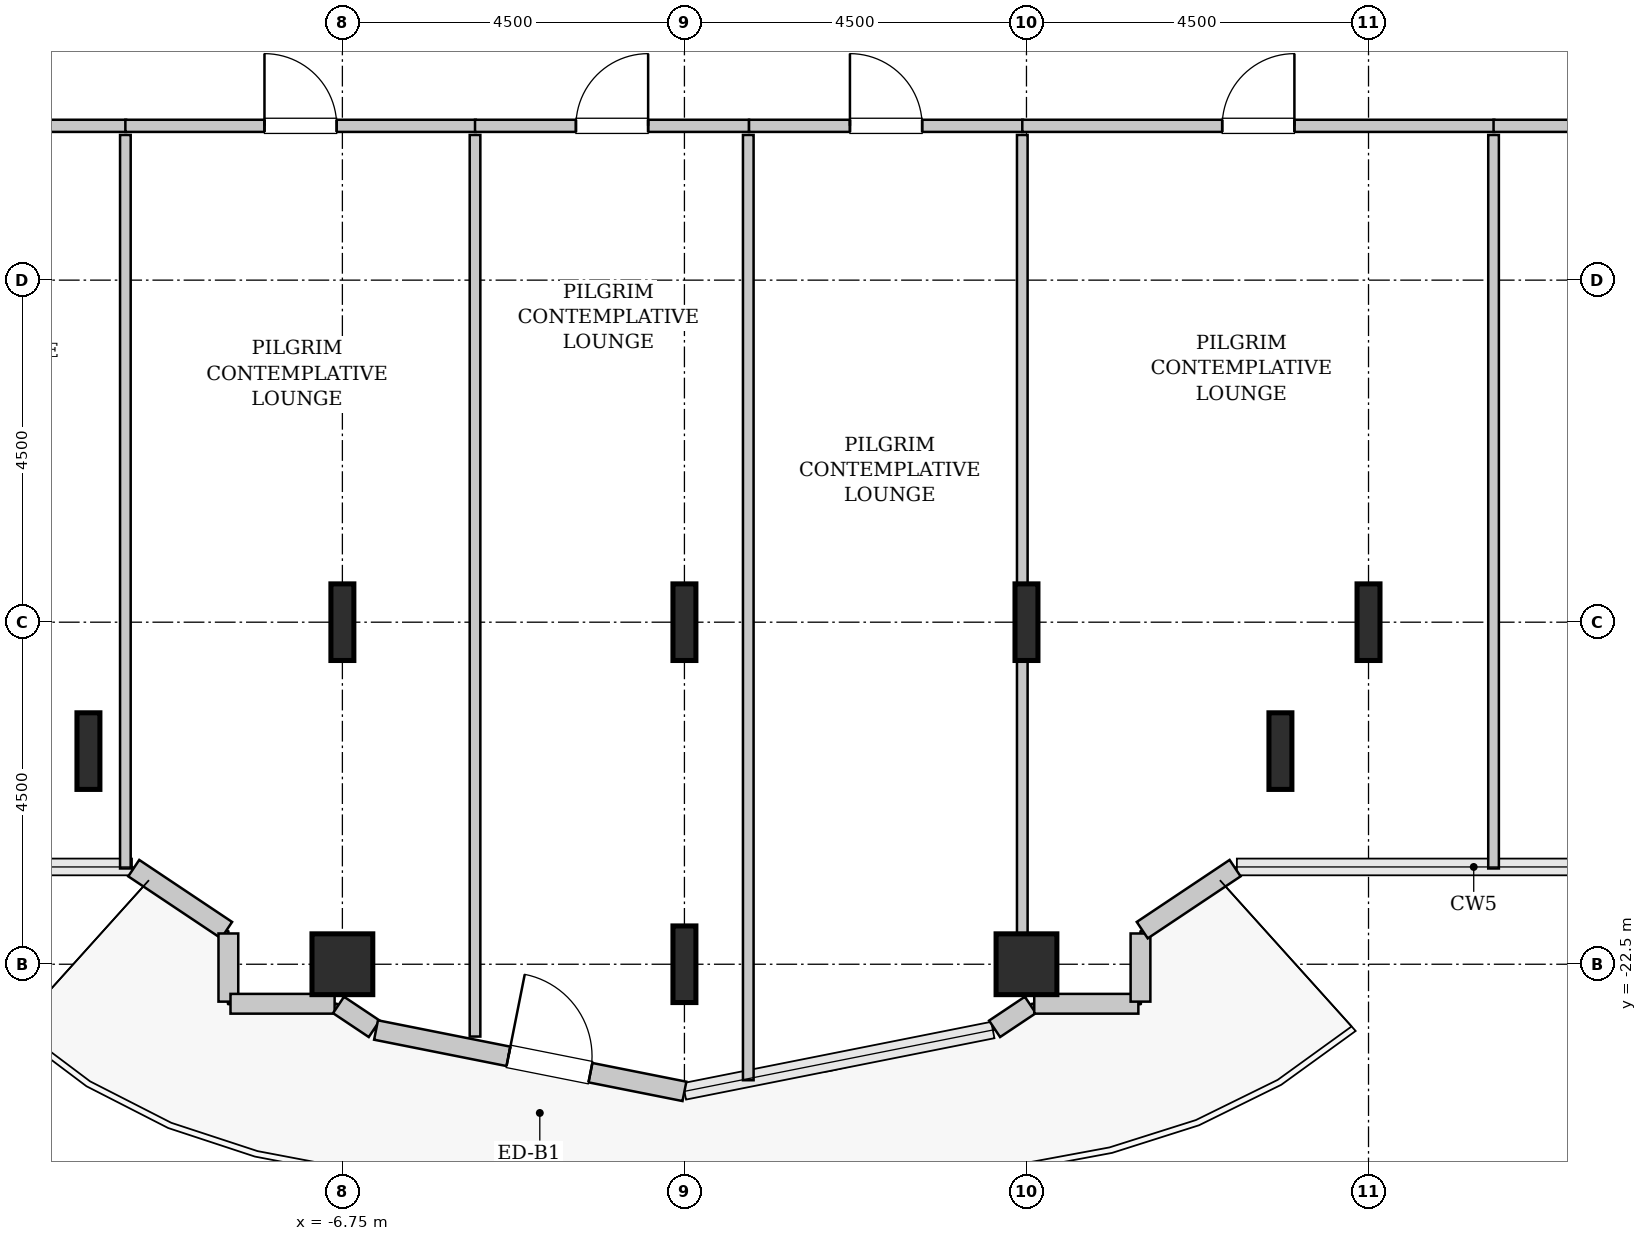
"""IFC4 building model, lengths in metres.
Left out: names, types, materials, properties, quantities, classifications, styles, units other than length and angle.
Written with IfcOpenShell. Run it as: python <this file> out.ifc"""

import sys

from ifc_helpers import new_model, si_unit, direction, frame, frame_2d, origin, origin_2d, place, context, subcontext, project, spatial, rectangle, hollow_rectangle, i_section, extrude, source, transform, mapped, element, fill, save


model = new_model("IFC4")
c1 = context("Model", 3, precision=1e-05, world=origin(), true_north=direction((0.0, 1.0)))
c2 = subcontext(c1, "Body", "Model", "MODEL_VIEW")
j1 = project(units=[si_unit("LENGTHUNIT", "METRE"), si_unit("PLANEANGLEUNIT", "RADIAN")], contexts=[c1])
p1 = place(None, origin())
s1 = spatial("IfcSite", under=j1, at=p1, CompositionType="ELEMENT")
p2 = place(p1, origin())
s2 = spatial("IfcBuilding", under=s1, at=p2, CompositionType="ELEMENT")
p3 = place(p2, frame((0.0, 0.0, 113.6)))
s3 = spatial("IfcBuildingStorey", under=s2, at=p3, CompositionType="ELEMENT", Elevation=113.6)
m1 = source(origin(), c2, "Body", "SweptSolid", [
    extrude(i_section(OverallWidth=0.302, OverallDepth=1.008, WebThickness=0.021, FlangeThickness=0.04, FilletRadius=0.03, at=origin_2d()), origin(), (0.0, 0.0, 1.0), 3.8),
])
p4 = place(p3, frame((-10.091, -19.696, 0.0), z_axis=(0.0, 0.0, 1.0), x_axis=(1.0, 0.0, 0.0)))
e1 = element("IfcColumn", 1, at=p4, inside=s3, PredefinedType="COLUMN", context=c2, shape_type="MappedRepresentation", body=[
    mapped(m1, transform((0.0, 0.0, 0.0), x_axis=(1.0, 0.0, 0.0), y_axis=(0.0, 1.0, 0.0), z_axis=(0.0, 0.0, 1.0), scale=1.0)),
])
m2 = source(origin(), c2, "Body", "SweptSolid", [
    extrude(hollow_rectangle(XDim=0.8, YDim=0.8, WallThickness=0.04, InnerFilletRadius=0.04, OuterFilletRadius=0.08, at=origin_2d()), origin(), (0.0, 0.0, 1.0), 3.8),
])
p5 = place(p3, frame((-6.75, -22.5, 0.0), z_axis=(0.0, 0.0, 1.0), x_axis=(1.0, 0.0, 0.0)))
e2 = element("IfcColumn", 2, at=p5, inside=s3, PredefinedType="COLUMN", context=c2, shape_type="MappedRepresentation", body=[
    mapped(m2, transform((0.0, 0.0, 0.0), x_axis=(1.0, 0.0, 0.0), y_axis=(0.0, 1.0, 0.0), z_axis=(0.0, 0.0, 1.0), scale=1.0)),
])
for number, where, z_axis, x_axis in (
    (3, (-6.75, -18.0, 0.0), (0.0, 0.0, 1.0), (1.0, 0.0, 0.0)),
    (4, (-2.25, -22.5, 0.0), (0.0, 0.0, 1.0), (1.0, 0.0, 0.0)),
    (5, (-2.25, -18.0, 0.0), (0.0, 0.0, 1.0), (1.0, 0.0, 0.0)),
):
    element("IfcColumn", number, at=place(p3, frame(where, z_axis=z_axis, x_axis=x_axis)), inside=s3, PredefinedType="COLUMN", context=c2, shape_type="MappedRepresentation", body=[
        mapped(m1, transform((0.0, 0.0, 0.0), x_axis=(1.0, 0.0, 0.0), y_axis=(0.0, 1.0, 0.0), z_axis=(0.0, 0.0, 1.0), scale=1.0)),
    ])
p6 = place(p3, frame((2.25, -22.5, 0.0), z_axis=(0.0, 0.0, 1.0), x_axis=(1.0, 0.0, 0.0)))
e6 = element("IfcColumn", 6, at=p6, inside=s3, PredefinedType="COLUMN", context=c2, shape_type="MappedRepresentation", body=[
    mapped(m2, transform((0.0, 0.0, 0.0), x_axis=(1.0, 0.0, 0.0), y_axis=(0.0, 1.0, 0.0), z_axis=(0.0, 0.0, 1.0), scale=1.0)),
])
for number, where, z_axis, x_axis in (
    (7, (2.25, -18.0, 0.0), (0.0, 0.0, 1.0), (1.0, 0.0, 0.0)),
    (8, (5.591, -19.696, 0.0), (0.0, 0.0, 1.0), (1.0, 0.0, 0.0)),
    (9, (6.75, -18.0, 0.0), (0.0, 0.0, 1.0), (1.0, 0.0, 0.0)),
):
    element("IfcColumn", number, at=place(p3, frame(where, z_axis=z_axis, x_axis=x_axis)), inside=s3, PredefinedType="COLUMN", context=c2, shape_type="MappedRepresentation", body=[
        mapped(m1, transform((0.0, 0.0, 0.0), x_axis=(1.0, 0.0, 0.0), y_axis=(0.0, 1.0, 0.0), z_axis=(0.0, 0.0, 1.0), scale=1.0)),
    ])
m3 = source(origin(), c2, "Body", "SweptSolid", [
    extrude(rectangle(XDim=1.469, YDim=0.26, at=frame_2d((0.734, 0.0))), origin(), (0.0, 0.0, 1.0), 3.55),
])
p7 = place(p3, frame((-9.495, -21.236, 0.0), z_axis=(0.0, 0.0, 1.0), x_axis=(0.831461760506, -0.555581983884, 0.0)))
e10 = element("IfcWall", 10, at=p7, inside=s3, PredefinedType="SOLIDWALL", context=c2, shape_type="MappedRepresentation", body=[
    mapped(m3, transform((0.0, 0.0, 0.0), x_axis=(1.0, 0.0, 0.0), y_axis=(0.0, 1.0, 0.0), z_axis=(0.0, 0.0, 1.0), scale=1.0)),
])
m4 = source(origin(), c2, "Body", "SweptSolid", [
    extrude(rectangle(XDim=0.897, YDim=0.26, at=frame_2d((0.448, 0.0))), origin(), (0.0, 0.0, 1.0), 3.55),
])
p8 = place(p3, frame((-8.25, -22.095, 0.0), z_axis=(0.0, 0.0, 1.0), x_axis=(0.0, -1.0, 0.0)))
e11 = element("IfcWall", 11, at=p8, inside=s3, PredefinedType="SOLIDWALL", context=c2, shape_type="MappedRepresentation", body=[
    mapped(m4, transform((0.0, 0.0, 0.0), x_axis=(1.0, 0.0, 0.0), y_axis=(0.0, 1.0, 0.0), z_axis=(0.0, 0.0, 1.0), scale=1.0)),
])
m5 = source(origin(), c2, "Body", "SweptSolid", [
    extrude(rectangle(XDim=1.37, YDim=0.26, at=frame_2d((0.685, 0.0))), origin(), (0.0, 0.0, 1.0), 3.55),
])
p9 = place(p3, frame((-8.222, -23.02, 0.0), z_axis=(0.0, 0.0, 1.0), x_axis=(1.0, 0.0, 0.0)))
e12 = element("IfcWall", 12, at=p9, inside=s3, PredefinedType="SOLIDWALL", context=c2, shape_type="MappedRepresentation", body=[
    mapped(m5, transform((0.0, 0.0, 0.0), x_axis=(1.0, 0.0, 0.0), y_axis=(0.0, 1.0, 0.0), z_axis=(0.0, 0.0, 1.0), scale=1.0)),
])
m6 = source(origin(), c2, "Body", "SweptSolid", [
    extrude(rectangle(XDim=0.565, YDim=0.26, at=frame_2d((0.283, 0.0))), origin(), (0.0, 0.0, 1.0), 3.55),
])
p10 = place(p3, frame((-6.801, -23.036, 0.0), z_axis=(0.0, 0.0, 1.0), x_axis=(0.831651492666, -0.555297933317, 0.0)))
e13 = element("IfcWall", 13, at=p10, inside=s3, PredefinedType="SOLIDWALL", context=c2, shape_type="MappedRepresentation", body=[
    mapped(m6, transform((0.0, 0.0, 0.0), x_axis=(1.0, 0.0, 0.0), y_axis=(0.0, 1.0, 0.0), z_axis=(0.0, 0.0, 1.0), scale=1.0)),
])
m7 = source(origin(), c2, "Body", "SweptSolid", [
    extrude(rectangle(XDim=4.137, YDim=0.26, at=frame_2d((2.068, 0.0))), origin(), (0.0, 0.0, 1.0), 3.55),
])
p11 = place(p3, frame((-6.307, -23.365, 0.0), z_axis=(0.0, 0.0, 1.0), x_axis=(0.980782170794, -0.195105954428, 0.0)))
e14 = element("IfcWall", 14, at=p11, inside=s3, PredefinedType="SOLIDWALL", context=c2, shape_type="MappedRepresentation", body=[
    mapped(m7, transform((0.0, 0.0, 0.0), x_axis=(1.0, 0.0, 0.0), y_axis=(0.0, 1.0, 0.0), z_axis=(0.0, 0.0, 1.0), scale=1.0)),
])
p12 = place(p11, frame((1.776, 0.0, 0.0)))
e15 = element("IfcOpeningElement", 15, at=p12, cuts=e14, PredefinedType="OPENING", context=c2, shape_type="SweptSolid", body=[
    extrude(rectangle(XDim=1.1, YDim=2.2, at=frame_2d((0.55, 1.1))), frame((0.0, 0.14, 0.0), z_axis=(0.0, -1.0, 0.0), x_axis=(1.0, 0.0, 0.0)), (0.0, 0.0, 1.0), 0.28),
])
p13 = place(p3, frame((1.831, -23.35, 0.0), z_axis=(0.0, 0.0, 1.0), x_axis=(0.831651492666, 0.555297933317, 0.0)))
e16 = element("IfcWall", 16, at=p13, inside=s3, PredefinedType="SOLIDWALL", context=c2, shape_type="MappedRepresentation", body=[
    mapped(m6, transform((0.0, 0.0, 0.0), x_axis=(1.0, 0.0, 0.0), y_axis=(0.0, 1.0, 0.0), z_axis=(0.0, 0.0, 1.0), scale=1.0)),
])
p14 = place(p3, frame((2.352, -23.02, 0.0), z_axis=(0.0, 0.0, 1.0), x_axis=(1.0, 0.0, 0.0)))
e17 = element("IfcWall", 17, at=p14, inside=s3, PredefinedType="SOLIDWALL", context=c2, shape_type="MappedRepresentation", body=[
    mapped(m5, transform((0.0, 0.0, 0.0), x_axis=(1.0, 0.0, 0.0), y_axis=(0.0, 1.0, 0.0), z_axis=(0.0, 0.0, 1.0), scale=1.0)),
])
p15 = place(p3, frame((3.75, -22.992, 0.0), z_axis=(0.0, 0.0, 1.0), x_axis=(0.0, 1.0, 0.0)))
e18 = element("IfcWall", 18, at=p15, inside=s3, PredefinedType="SOLIDWALL", context=c2, shape_type="MappedRepresentation", body=[
    mapped(m4, transform((0.0, 0.0, 0.0), x_axis=(1.0, 0.0, 0.0), y_axis=(0.0, 1.0, 0.0), z_axis=(0.0, 0.0, 1.0), scale=1.0)),
])
p16 = place(p3, frame((3.773, -22.052, 0.0), z_axis=(0.0, 0.0, 1.0), x_axis=(0.831461760506, 0.555581983884, 0.0)))
e19 = element("IfcWall", 19, at=p16, inside=s3, PredefinedType="SOLIDWALL", context=c2, shape_type="MappedRepresentation", body=[
    mapped(m3, transform((0.0, 0.0, 0.0), x_axis=(1.0, 0.0, 0.0), y_axis=(0.0, 1.0, 0.0), z_axis=(0.0, 0.0, 1.0), scale=1.0)),
])
m8 = source(origin(), c2, "Body", "SweptSolid", [
    extrude(rectangle(XDim=4.025, YDim=0.16, at=frame_2d((2.013, 0.0))), origin(), (0.0, 0.0, 1.0), 3.535),
])
p17 = place(p3, frame((-13.62, -11.47, 0.0), z_axis=(0.0, 0.0, 1.0), x_axis=(1.0, 0.0, 0.0)))
e20 = element("IfcWall", 20, at=p17, inside=s3, PredefinedType="PARTITIONING", context=c2, shape_type="MappedRepresentation", body=[
    mapped(m8, transform((0.0, 0.0, 0.0), x_axis=(1.0, 0.0, 0.0), y_axis=(0.0, 1.0, 0.0), z_axis=(0.0, 0.0, 1.0), scale=1.0)),
])
p18 = place(p17, frame((1.538, 0.0, 0.0)))
e21 = element("IfcOpeningElement", 21, at=p18, cuts=e20, PredefinedType="OPENING", context=c2, shape_type="SweptSolid", body=[
    extrude(rectangle(XDim=0.95, YDim=2.1, at=frame_2d((0.475, 1.05))), frame((0.0, 0.09, 0.0), z_axis=(0.0, -1.0, 0.0), x_axis=(1.0, 0.0, 0.0)), (0.0, 0.0, 1.0), 0.18),
])
m9 = source(origin(), c2, "Body", "SweptSolid", [
    extrude(rectangle(XDim=9.65, YDim=0.14, at=frame_2d((4.825, 0.0))), origin(), (0.0, 0.0, 1.0), 3.535),
])
p19 = place(p3, frame((-9.605, -21.24, 0.0), z_axis=(0.0, 0.0, 1.0), x_axis=(0.0, 1.0, 0.0)))
e22 = element("IfcWall", 22, at=p19, inside=s3, PredefinedType="PARTITIONING", context=c2, shape_type="MappedRepresentation", body=[
    mapped(m9, transform((0.0, 0.0, 0.0), x_axis=(1.0, 0.0, 0.0), y_axis=(0.0, 1.0, 0.0), z_axis=(0.0, 0.0, 1.0), scale=1.0)),
])
m10 = source(origin(), c2, "Body", "SweptSolid", [
    extrude(rectangle(XDim=4.61, YDim=0.16, at=frame_2d((2.305, 0.0))), origin(), (0.0, 0.0, 1.0), 3.535),
])
p20 = place(p3, frame((-9.605, -11.47, 0.0), z_axis=(0.0, 0.0, 1.0), x_axis=(1.0, 0.0, 0.0)))
e23 = element("IfcWall", 23, at=p20, inside=s3, PredefinedType="PARTITIONING", context=c2, shape_type="MappedRepresentation", body=[
    mapped(m10, transform((0.0, 0.0, 0.0), x_axis=(1.0, 0.0, 0.0), y_axis=(0.0, 1.0, 0.0), z_axis=(0.0, 0.0, 1.0), scale=1.0)),
])
p21 = place(p20, frame((1.83, 0.0, 0.0)))
e24 = element("IfcOpeningElement", 24, at=p21, cuts=e23, PredefinedType="OPENING", context=c2, shape_type="SweptSolid", body=[
    extrude(rectangle(XDim=0.95, YDim=2.1, at=frame_2d((0.475, 1.05))), frame((0.0, 0.09, 0.0), z_axis=(0.0, -1.0, 0.0), x_axis=(1.0, 0.0, 0.0)), (0.0, 0.0, 1.0), 0.18),
])
m11 = source(origin(), c2, "Body", "SweptSolid", [
    extrude(rectangle(XDim=11.861, YDim=0.14, at=frame_2d((5.931, 0.0))), origin(), (0.0, 0.0, 1.0), 3.535),
])
p22 = place(p3, frame((-5.005, -23.451, 0.0), z_axis=(0.0, 0.0, 1.0), x_axis=(0.0, 1.0, 0.0)))
e25 = element("IfcWall", 25, at=p22, inside=s3, PredefinedType="PARTITIONING", context=c2, shape_type="MappedRepresentation", body=[
    mapped(m11, transform((0.0, 0.0, 0.0), x_axis=(1.0, 0.0, 0.0), y_axis=(0.0, 1.0, 0.0), z_axis=(0.0, 0.0, 1.0), scale=1.0)),
])
m12 = source(origin(), c2, "Body", "SweptSolid", [
    extrude(rectangle(XDim=3.605, YDim=0.16, at=frame_2d((1.802, 0.0))), origin(), (0.0, 0.0, 1.0), 3.535),
])
p23 = place(p3, frame((-5.005, -11.47, 0.0), z_axis=(0.0, 0.0, 1.0), x_axis=(1.0, 0.0, 0.0)))
e26 = element("IfcWall", 26, at=p23, inside=s3, PredefinedType="PARTITIONING", context=c2, shape_type="MappedRepresentation", body=[
    mapped(m12, transform((0.0, 0.0, 0.0), x_axis=(1.0, 0.0, 0.0), y_axis=(0.0, 1.0, 0.0), z_axis=(0.0, 0.0, 1.0), scale=1.0)),
])
p24 = place(p23, frame((1.327, 0.0, 0.0)))
e27 = element("IfcOpeningElement", 27, at=p24, cuts=e26, PredefinedType="OPENING", context=c2, shape_type="SweptSolid", body=[
    extrude(rectangle(XDim=0.95, YDim=2.1, at=frame_2d((0.475, 1.05))), frame((0.0, 0.09, 0.0), z_axis=(0.0, -1.0, 0.0), x_axis=(1.0, 0.0, 0.0)), (0.0, 0.0, 1.0), 0.18),
])
m13 = source(origin(), c2, "Body", "SweptSolid", [
    extrude(rectangle(XDim=12.436, YDim=0.14, at=frame_2d((6.218, 0.0))), origin(), (0.0, 0.0, 1.0), 3.535),
])
p25 = place(p3, frame((-1.41, -24.026, 0.0), z_axis=(0.0, 0.0, 1.0), x_axis=(0.0, 1.0, 0.0)))
e28 = element("IfcWall", 28, at=p25, inside=s3, PredefinedType="PARTITIONING", context=c2, shape_type="MappedRepresentation", body=[
    mapped(m13, transform((0.0, 0.0, 0.0), x_axis=(1.0, 0.0, 0.0), y_axis=(0.0, 1.0, 0.0), z_axis=(0.0, 0.0, 1.0), scale=1.0)),
])
p26 = place(p3, frame((-1.4, -11.47, 0.0), z_axis=(0.0, 0.0, 1.0), x_axis=(1.0, 0.0, 0.0)))
e29 = element("IfcWall", 29, at=p26, inside=s3, PredefinedType="PARTITIONING", context=c2, shape_type="MappedRepresentation", body=[
    mapped(m12, transform((0.0, 0.0, 0.0), x_axis=(1.0, 0.0, 0.0), y_axis=(0.0, 1.0, 0.0), z_axis=(0.0, 0.0, 1.0), scale=1.0)),
])
p27 = place(p26, frame((1.327, 0.0, 0.0)))
e30 = element("IfcOpeningElement", 30, at=p27, cuts=e29, PredefinedType="OPENING", context=c2, shape_type="SweptSolid", body=[
    extrude(rectangle(XDim=0.95, YDim=2.1, at=frame_2d((0.475, 1.05))), frame((0.0, 0.09, 0.0), z_axis=(0.0, -1.0, 0.0), x_axis=(1.0, 0.0, 0.0)), (0.0, 0.0, 1.0), 0.18),
])
m14 = source(origin(), c2, "Body", "SweptSolid", [
    extrude(rectangle(XDim=11.314, YDim=0.14, at=frame_2d((5.657, 0.0))), origin(), (0.0, 0.0, 1.0), 2.875),
])
p28 = place(p3, frame((2.195, -22.904, 0.0), z_axis=(0.0, 0.0, 1.0), x_axis=(0.0, 1.0, 0.0)))
e31 = element("IfcWall", 31, at=p28, inside=s3, PredefinedType="PARTITIONING", context=c2, shape_type="MappedRepresentation", body=[
    mapped(m14, transform((0.0, 0.0, 0.0), x_axis=(1.0, 0.0, 0.0), y_axis=(0.0, 1.0, 0.0), z_axis=(0.0, 0.0, 1.0), scale=1.0)),
])
m15 = source(origin(), c2, "Body", "SweptSolid", [
    extrude(rectangle(XDim=6.21, YDim=0.16, at=frame_2d((3.105, 0.0))), origin(), (0.0, 0.0, 1.0), 3.535),
])
p29 = place(p3, frame((2.195, -11.47, 0.0), z_axis=(0.0, 0.0, 1.0), x_axis=(1.0, 0.0, 0.0)))
e32 = element("IfcWall", 32, at=p29, inside=s3, PredefinedType="PARTITIONING", context=c2, shape_type="MappedRepresentation", body=[
    mapped(m15, transform((0.0, 0.0, 0.0), x_axis=(1.0, 0.0, 0.0), y_axis=(0.0, 1.0, 0.0), z_axis=(0.0, 0.0, 1.0), scale=1.0)),
])
p30 = place(p29, frame((2.63, 0.0, 0.0)))
e33 = element("IfcOpeningElement", 33, at=p30, cuts=e32, PredefinedType="OPENING", context=c2, shape_type="SweptSolid", body=[
    extrude(rectangle(XDim=0.95, YDim=2.1, at=frame_2d((0.475, 1.05))), frame((0.0, 0.09, 0.0), z_axis=(0.0, -1.0, 0.0), x_axis=(1.0, 0.0, 0.0)), (0.0, 0.0, 1.0), 0.18),
])
p31 = place(p3, frame((8.395, -21.24, 0.0), z_axis=(0.0, 0.0, 1.0), x_axis=(0.0, 1.0, 0.0)))
e34 = element("IfcWall", 34, at=p31, inside=s3, PredefinedType="PARTITIONING", context=c2, shape_type="MappedRepresentation", body=[
    mapped(m9, transform((0.0, 0.0, 0.0), x_axis=(1.0, 0.0, 0.0), y_axis=(0.0, 1.0, 0.0), z_axis=(0.0, 0.0, 1.0), scale=1.0)),
])
m16 = source(origin(), c2, "Body", "SweptSolid", [
    extrude(rectangle(XDim=5.225, YDim=0.16, at=frame_2d((2.613, 0.0))), origin(), (0.0, 0.0, 1.0), 3.535),
])
p32 = place(p3, frame((8.395, -11.47, 0.0), z_axis=(0.0, 0.0, 1.0), x_axis=(1.0, 0.0, 0.0)))
e35 = element("IfcWall", 35, at=p32, inside=s3, PredefinedType="PARTITIONING", context=c2, shape_type="MappedRepresentation", body=[
    mapped(m16, transform((0.0, 0.0, 0.0), x_axis=(1.0, 0.0, 0.0), y_axis=(0.0, 1.0, 0.0), z_axis=(0.0, 0.0, 1.0), scale=1.0)),
])
p33 = place(p32, frame((2.137, 0.0, 0.0)))
e36 = element("IfcOpeningElement", 36, at=p33, cuts=e35, PredefinedType="OPENING", context=c2, shape_type="SweptSolid", body=[
    extrude(rectangle(XDim=0.95, YDim=2.1, at=frame_2d((0.475, 1.05))), frame((0.0, 0.09, 0.0), z_axis=(0.0, -1.0, 0.0), x_axis=(1.0, 0.0, 0.0)), (0.0, 0.0, 1.0), 0.18),
])
m17 = source(origin(), c2, "Body", "SweptSolid", [
    extrude(rectangle(XDim=1.1, YDim=2.2, at=frame_2d((0.55, 1.1))), frame((0.0, 0.025, 0.0), z_axis=(0.0, -1.0, 0.0), x_axis=(1.0, 0.0, 0.0)), (0.0, 0.0, 1.0), 0.05),
])
p34 = place(p12, origin())
e37 = element("IfcDoor", 37, at=p34, inside=s3, OperationType="SINGLE_SWING_LEFT", PredefinedType="DOOR", context=c2, shape_type="MappedRepresentation", body=[
    mapped(m17, transform((0.0, 0.0, 0.0), x_axis=(1.0, 0.0, 0.0), y_axis=(0.0, 1.0, 0.0), z_axis=(0.0, 0.0, 1.0), scale=1.0)),
])
fill(e15, e37)
m18 = source(origin(), c2, "Body", "SweptSolid", [
    extrude(rectangle(XDim=0.95, YDim=2.1, at=frame_2d((0.475, 1.05))), frame((0.0, 0.025, 0.0), z_axis=(0.0, -1.0, 0.0), x_axis=(1.0, 0.0, 0.0)), (0.0, 0.0, 1.0), 0.05),
])
p35 = place(p21, origin())
e38 = element("IfcDoor", 38, at=p35, inside=s3, OperationType="SINGLE_SWING_LEFT", PredefinedType="DOOR", context=c2, shape_type="MappedRepresentation", body=[
    mapped(m18, transform((0.0, 0.0, 0.0), x_axis=(1.0, 0.0, 0.0), y_axis=(0.0, 1.0, 0.0), z_axis=(0.0, 0.0, 1.0), scale=1.0)),
])
fill(e24, e38)
p36 = place(p24, origin())
e39 = element("IfcDoor", 39, at=p36, inside=s3, OperationType="SINGLE_SWING_RIGHT", PredefinedType="DOOR", context=c2, shape_type="MappedRepresentation", body=[
    mapped(m18, transform((0.0, 0.0, 0.0), x_axis=(1.0, 0.0, 0.0), y_axis=(0.0, 1.0, 0.0), z_axis=(0.0, 0.0, 1.0), scale=1.0)),
])
fill(e27, e39)
p37 = place(p27, origin())
e40 = element("IfcDoor", 40, at=p37, inside=s3, OperationType="SINGLE_SWING_LEFT", PredefinedType="DOOR", context=c2, shape_type="MappedRepresentation", body=[
    mapped(m18, transform((0.0, 0.0, 0.0), x_axis=(1.0, 0.0, 0.0), y_axis=(0.0, 1.0, 0.0), z_axis=(0.0, 0.0, 1.0), scale=1.0)),
])
fill(e30, e40)
p38 = place(p30, origin())
e41 = element("IfcDoor", 41, at=p38, inside=s3, OperationType="SINGLE_SWING_RIGHT", PredefinedType="DOOR", context=c2, shape_type="MappedRepresentation", body=[
    mapped(m18, transform((0.0, 0.0, 0.0), x_axis=(1.0, 0.0, 0.0), y_axis=(0.0, 1.0, 0.0), z_axis=(0.0, 0.0, 1.0), scale=1.0)),
])
fill(e33, e41)
save(model, sys.argv[1])
